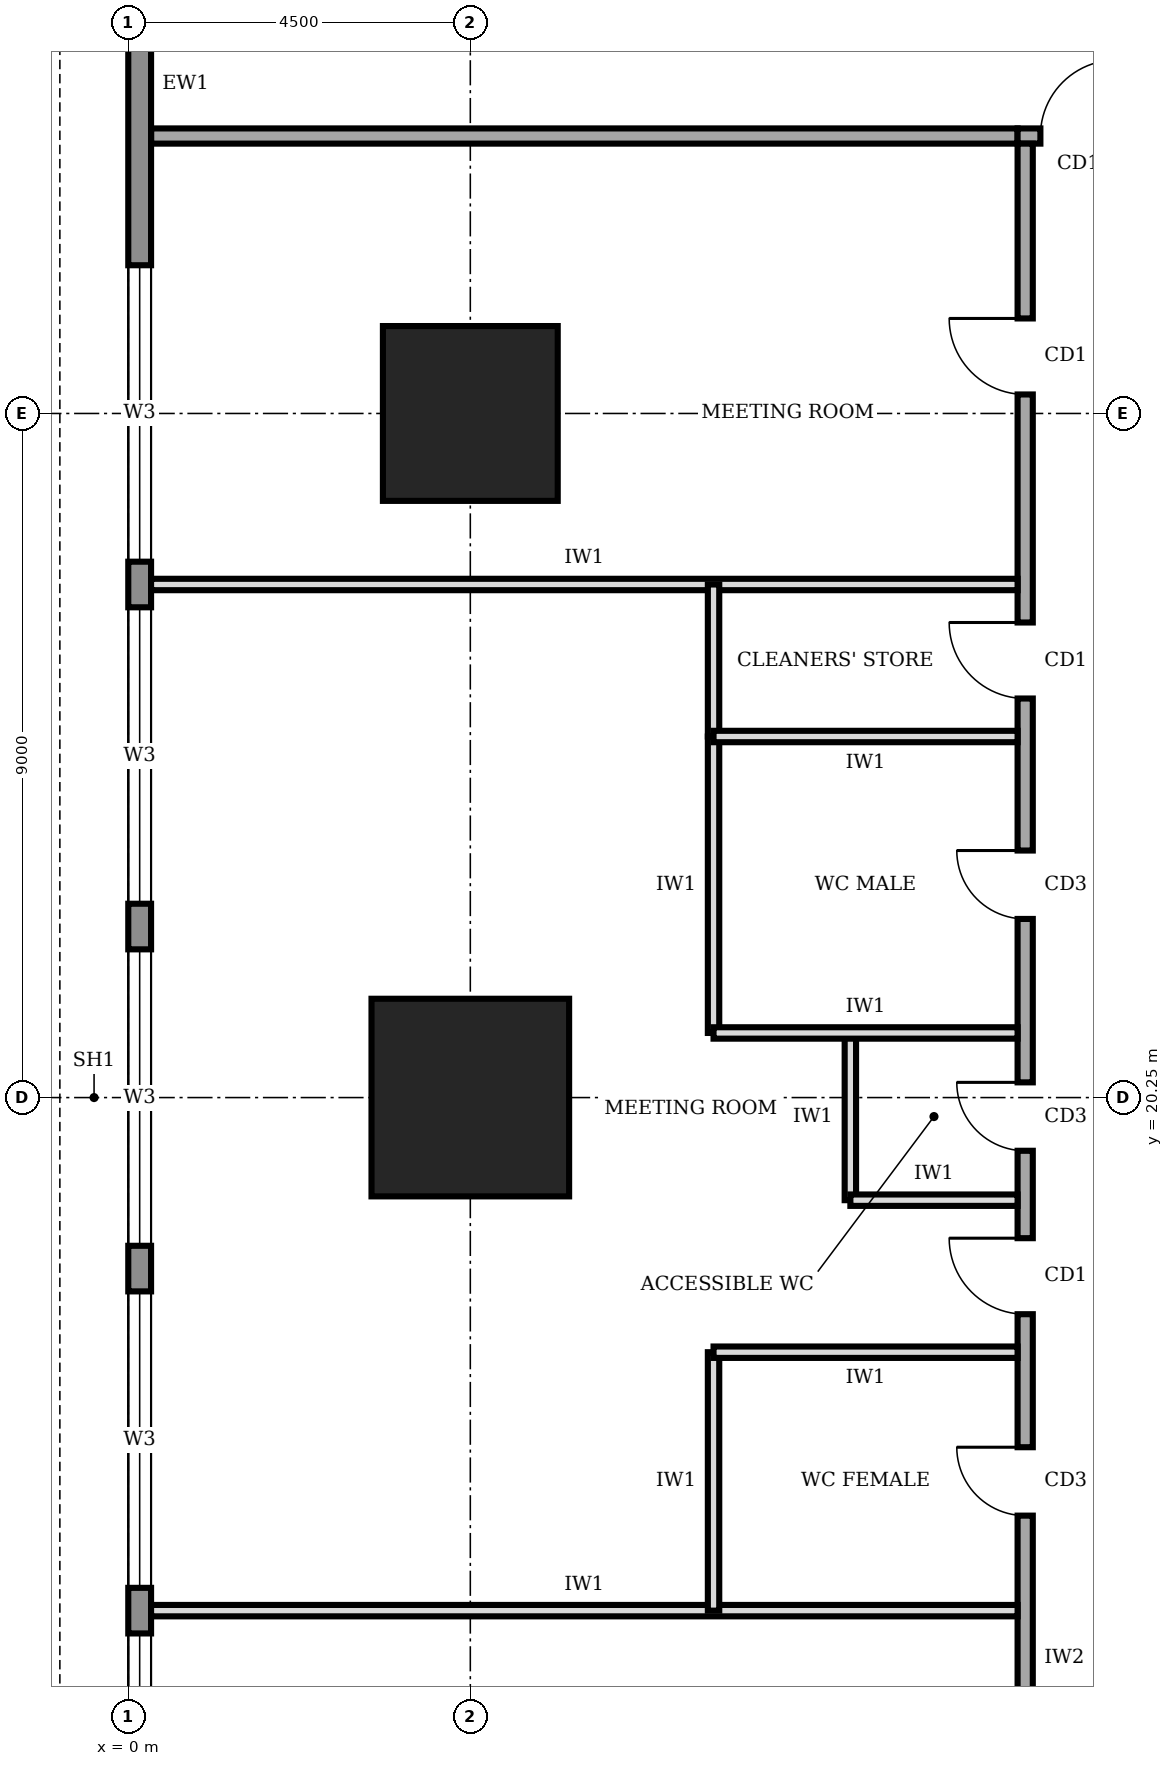
"""IFC4 building model, lengths in metres.
Left out: names, types, materials, properties, quantities, classifications, styles, units other than length and angle.
Written with IfcOpenShell. Run it as: python <this file> out.ifc"""

import sys

from ifc_helpers import new_model, si_unit, direction, frame, frame_2d, origin, origin_2d, place, context, subcontext, project, spatial, rectangle, extrude, element, fill, save


model = new_model("IFC4")
c1 = context("Model", 3, precision=1e-05, world=origin(), true_north=direction((0.0, 1.0)))
c2 = subcontext(c1, "Body", "Model", "MODEL_VIEW")
j1 = project(units=[si_unit("LENGTHUNIT", "METRE"), si_unit("PLANEANGLEUNIT", "RADIAN")], contexts=[c1])
p1 = place(None, origin())
s1 = spatial("IfcSite", under=j1, at=p1, CompositionType="ELEMENT")
p2 = place(p1, origin())
s2 = spatial("IfcBuilding", under=s1, at=p2, CompositionType="ELEMENT")
p3 = place(p2, frame((0.0, 0.0, 89.0)))
s3 = spatial("IfcBuildingStorey", under=s2, at=p3, CompositionType="ELEMENT", Elevation=89.0)
p4 = place(p3, frame((4.5, 20.25, 0.0), z_axis=(0.0, 0.0, 1.0), x_axis=(1.0, 0.0, 0.0)))
e1 = element("IfcColumn", 1, at=p4, inside=s3, PredefinedType="COLUMN", context=c2, shape_type="SweptSolid", body=[
    extrude(rectangle(XDim=2.6, YDim=2.6, at=origin_2d()), origin(), (0.0, 0.0, 1.0), 4.0),
])
p5 = place(p3, frame((4.5, 29.25, 0.0), z_axis=(0.0, 0.0, 1.0), x_axis=(1.0, 0.0, 0.0)))
e2 = element("IfcColumn", 2, at=p5, inside=s3, PredefinedType="COLUMN", context=c2, shape_type="SweptSolid", body=[
    extrude(rectangle(XDim=2.3, YDim=2.3, at=origin_2d()), origin(), (0.0, 0.0, 1.0), 4.0),
])
p6 = place(p3, frame((0.15, 35.98, 0.0), z_axis=(0.0, 0.0, 1.0), x_axis=(0.0, -1.0, 0.0)))
e3 = element("IfcWall", 3, at=p6, inside=s3, PredefinedType="STANDARD", context=c2, shape_type="SweptSolid", body=[
    extrude(rectangle(XDim=31.46, YDim=0.3, at=frame_2d((15.73, 0.0))), origin(), (0.0, 0.0, 1.0), 3.75),
])
p7 = place(p6, frame((27.28, 0.0, 0.95)))
e4 = element("IfcOpeningElement", 4, at=p7, cuts=e3, PredefinedType="OPENING", context=c2, shape_type="SweptSolid", body=[
    extrude(rectangle(XDim=3.9, YDim=1.8, at=frame_2d((1.95, 0.9))), frame((0.0, 0.16, 0.0), z_axis=(0.0, -1.0, 0.0), x_axis=(1.0, 0.0, 0.0)), (0.0, 0.0, 1.0), 0.32),
])
p8 = place(p6, frame((22.78, 0.0, 0.95)))
e5 = element("IfcOpeningElement", 5, at=p8, cuts=e3, PredefinedType="OPENING", context=c2, shape_type="SweptSolid", body=[
    extrude(rectangle(XDim=3.9, YDim=1.8, at=frame_2d((1.95, 0.9))), frame((0.0, 0.16, 0.0), z_axis=(0.0, -1.0, 0.0), x_axis=(1.0, 0.0, 0.0)), (0.0, 0.0, 1.0), 0.32),
])
p9 = place(p6, frame((18.28, 0.0, 0.95)))
e6 = element("IfcOpeningElement", 6, at=p9, cuts=e3, PredefinedType="OPENING", context=c2, shape_type="SweptSolid", body=[
    extrude(rectangle(XDim=3.9, YDim=1.8, at=frame_2d((1.95, 0.9))), frame((0.0, 0.16, 0.0), z_axis=(0.0, -1.0, 0.0), x_axis=(1.0, 0.0, 0.0)), (0.0, 0.0, 1.0), 0.32),
])
p10 = place(p6, frame((13.78, 0.0, 0.95)))
e7 = element("IfcOpeningElement", 7, at=p10, cuts=e3, PredefinedType="OPENING", context=c2, shape_type="SweptSolid", body=[
    extrude(rectangle(XDim=3.9, YDim=1.8, at=frame_2d((1.95, 0.9))), frame((0.0, 0.16, 0.0), z_axis=(0.0, -1.0, 0.0), x_axis=(1.0, 0.0, 0.0)), (0.0, 0.0, 1.0), 0.32),
])
p11 = place(p6, frame((9.28, 0.0, 0.95)))
e8 = element("IfcOpeningElement", 8, at=p11, cuts=e3, PredefinedType="OPENING", context=c2, shape_type="SweptSolid", body=[
    extrude(rectangle(XDim=3.9, YDim=1.8, at=frame_2d((1.95, 0.9))), frame((0.0, 0.16, 0.0), z_axis=(0.0, -1.0, 0.0), x_axis=(1.0, 0.0, 0.0)), (0.0, 0.0, 1.0), 0.32),
])
p12 = place(p6, frame((4.78, 0.0, 0.95)))
e9 = element("IfcOpeningElement", 9, at=p12, cuts=e3, PredefinedType="OPENING", context=c2, shape_type="SweptSolid", body=[
    extrude(rectangle(XDim=3.9, YDim=1.8, at=frame_2d((1.95, 0.9))), frame((0.0, 0.16, 0.0), z_axis=(0.0, -1.0, 0.0), x_axis=(1.0, 0.0, 0.0)), (0.0, 0.0, 1.0), 0.32),
])
p13 = place(p3, frame((40.2, 32.9, 0.0), z_axis=(0.0, 0.0, 1.0), x_axis=(-1.0, 0.0, 0.0)))
e10 = element("IfcWall", 10, at=p13, inside=s3, PredefinedType="SOLIDWALL", context=c2, shape_type="SweptSolid", body=[
    extrude(rectangle(XDim=28.5, YDim=0.2, at=frame_2d((14.25, 0.0))), origin(), (0.0, 0.0, 1.0), 3.75),
])
p14 = place(p13, frame((27.2, 0.0, 0.0)))
e11 = element("IfcOpeningElement", 11, at=p14, cuts=e10, PredefinedType="OPENING", context=c2, shape_type="SweptSolid", body=[
    extrude(rectangle(XDim=1.0, YDim=2.1, at=frame_2d((0.5, 1.05))), frame((0.0, 0.11, 0.0), z_axis=(0.0, -1.0, 0.0), x_axis=(1.0, 0.0, 0.0)), (0.0, 0.0, 1.0), 0.22),
])
p15 = place(p13, frame((23.95, 0.0, 0.0)))
e12 = element("IfcOpeningElement", 12, at=p15, cuts=e10, PredefinedType="OPENING", context=c2, shape_type="SweptSolid", body=[
    extrude(rectangle(XDim=1.0, YDim=2.1, at=frame_2d((0.5, 1.05))), frame((0.0, 0.11, 0.0), z_axis=(0.0, -1.0, 0.0), x_axis=(1.0, 0.0, 0.0)), (0.0, 0.0, 1.0), 0.22),
])
p16 = place(p13, frame((17.2, 0.0, 0.0)))
e13 = element("IfcOpeningElement", 13, at=p16, cuts=e10, PredefinedType="OPENING", context=c2, shape_type="SweptSolid", body=[
    extrude(rectangle(XDim=1.0, YDim=2.1, at=frame_2d((0.5, 1.05))), frame((0.0, 0.11, 0.0), z_axis=(0.0, -1.0, 0.0), x_axis=(1.0, 0.0, 0.0)), (0.0, 0.0, 1.0), 0.22),
])
p17 = place(p13, frame((6.0, 0.0, 0.0)))
e14 = element("IfcOpeningElement", 14, at=p17, cuts=e10, PredefinedType="OPENING", context=c2, shape_type="SweptSolid", body=[
    extrude(rectangle(XDim=1.0, YDim=2.1, at=frame_2d((0.5, 1.05))), frame((0.0, 0.11, 0.0), z_axis=(0.0, -1.0, 0.0), x_axis=(1.0, 0.0, 0.0)), (0.0, 0.0, 1.0), 0.22),
])
p18 = place(p3, frame((11.8, 32.8, 0.0), z_axis=(0.0, 0.0, 1.0), x_axis=(0.0, -1.0, 0.0)))
e15 = element("IfcWall", 15, at=p18, inside=s3, PredefinedType="SOLIDWALL", context=c2, shape_type="SweptSolid", body=[
    extrude(rectangle(XDim=25.3, YDim=0.2, at=frame_2d((12.65, 0.0))), origin(), (0.0, 0.0, 1.0), 3.75),
])
p19 = place(p18, frame((21.8, 0.0, 0.0)))
e16 = element("IfcOpeningElement", 16, at=p19, cuts=e15, PredefinedType="OPENING", context=c2, shape_type="SweptSolid", body=[
    extrude(rectangle(XDim=1.0, YDim=2.1, at=frame_2d((0.5, 1.05))), frame((0.0, 0.11, 0.0), z_axis=(0.0, -1.0, 0.0), x_axis=(1.0, 0.0, 0.0)), (0.0, 0.0, 1.0), 0.22),
])
p20 = place(p18, frame((17.15, 0.0, 0.0)))
e17 = element("IfcOpeningElement", 17, at=p20, cuts=e15, PredefinedType="OPENING", context=c2, shape_type="SweptSolid", body=[
    extrude(rectangle(XDim=0.9, YDim=2.1, at=frame_2d((0.45, 1.05))), frame((0.0, 0.11, 0.0), z_axis=(0.0, -1.0, 0.0), x_axis=(1.0, 0.0, 0.0)), (0.0, 0.0, 1.0), 0.22),
])
p21 = place(p18, frame((12.35, 0.0, 0.0)))
e18 = element("IfcOpeningElement", 18, at=p21, cuts=e15, PredefinedType="OPENING", context=c2, shape_type="SweptSolid", body=[
    extrude(rectangle(XDim=0.9, YDim=2.1, at=frame_2d((0.45, 1.05))), frame((0.0, 0.11, 0.0), z_axis=(0.0, -1.0, 0.0), x_axis=(1.0, 0.0, 0.0)), (0.0, 0.0, 1.0), 0.22),
])
p22 = place(p18, frame((9.3, 0.0, 0.0)))
e19 = element("IfcOpeningElement", 19, at=p22, cuts=e15, PredefinedType="OPENING", context=c2, shape_type="SweptSolid", body=[
    extrude(rectangle(XDim=0.9, YDim=2.1, at=frame_2d((0.45, 1.05))), frame((0.0, 0.11, 0.0), z_axis=(0.0, -1.0, 0.0), x_axis=(1.0, 0.0, 0.0)), (0.0, 0.0, 1.0), 0.22),
])
p23 = place(p18, frame((6.3, 0.0, 0.0)))
e20 = element("IfcOpeningElement", 20, at=p23, cuts=e15, PredefinedType="OPENING", context=c2, shape_type="SweptSolid", body=[
    extrude(rectangle(XDim=1.0, YDim=2.1, at=frame_2d((0.5, 1.05))), frame((0.0, 0.11, 0.0), z_axis=(0.0, -1.0, 0.0), x_axis=(1.0, 0.0, 0.0)), (0.0, 0.0, 1.0), 0.22),
])
p24 = place(p18, frame((14.4, 0.0, 0.0)))
e21 = element("IfcOpeningElement", 21, at=p24, cuts=e15, PredefinedType="OPENING", context=c2, shape_type="SweptSolid", body=[
    extrude(rectangle(XDim=1.0, YDim=2.1, at=frame_2d((0.5, 1.05))), frame((0.0, 0.11, 0.0), z_axis=(0.0, -1.0, 0.0), x_axis=(1.0, 0.0, 0.0)), (0.0, 0.0, 1.0), 0.22),
])
p25 = place(p18, frame((2.3, 0.0, 0.0)))
e22 = element("IfcOpeningElement", 22, at=p25, cuts=e15, PredefinedType="OPENING", context=c2, shape_type="SweptSolid", body=[
    extrude(rectangle(XDim=1.0, YDim=2.1, at=frame_2d((0.5, 1.05))), frame((0.0, 0.11, 0.0), z_axis=(0.0, -1.0, 0.0), x_axis=(1.0, 0.0, 0.0)), (0.0, 0.0, 1.0), 0.22),
])
p26 = place(p3, frame((0.3, 32.9, 0.0), z_axis=(0.0, 0.0, 1.0), x_axis=(1.0, 0.0, 0.0)))
e23 = element("IfcWall", 23, at=p26, inside=s3, PredefinedType="SOLIDWALL", context=c2, shape_type="SweptSolid", body=[
    extrude(rectangle(XDim=11.4, YDim=0.2, at=frame_2d((5.7, 0.0))), origin(), (0.0, 0.0, 1.0), 3.75),
])
for number, where, z_axis, x_axis in (
    (24, (0.3, 13.5, 0.0), (0.0, 0.0, 1.0), (1.0, 0.0, 0.0)),
    (25, (0.3, 27.0, 0.0), (0.0, 0.0, 1.0), (1.0, 0.0, 0.0)),
):
    element("IfcWall", number, at=place(p3, frame(where, z_axis=z_axis, x_axis=x_axis)), inside=s3, PredefinedType="PARTITIONING", context=c2, shape_type="SweptSolid", body=[
        extrude(rectangle(XDim=11.4, YDim=0.15, at=frame_2d((5.7, 0.0))), origin(), (0.0, 0.0, 1.0), 3.75),
    ])
p27 = place(p3, frame((11.7, 16.9, 0.0), z_axis=(0.0, 0.0, 1.0), x_axis=(-1.0, 0.0, 0.0)))
e26 = element("IfcWall", 26, at=p27, inside=s3, PredefinedType="PARTITIONING", context=c2, shape_type="SweptSolid", body=[
    extrude(rectangle(XDim=4.0, YDim=0.15, at=frame_2d((2.0, 0.0))), origin(), (0.0, 0.0, 1.0), 3.75),
])
p28 = place(p3, frame((11.7, 18.9, 0.0), z_axis=(0.0, 0.0, 1.0), x_axis=(-1.0, 0.0, 0.0)))
e27 = element("IfcWall", 27, at=p28, inside=s3, PredefinedType="PARTITIONING", context=c2, shape_type="SweptSolid", body=[
    extrude(rectangle(XDim=2.2, YDim=0.15, at=frame_2d((1.1, 0.0))), origin(), (0.0, 0.0, 1.0), 3.75),
])
p29 = place(p3, frame((11.7, 21.1, 0.0), z_axis=(0.0, 0.0, 1.0), x_axis=(-1.0, 0.0, 0.0)))
e28 = element("IfcWall", 28, at=p29, inside=s3, PredefinedType="PARTITIONING", context=c2, shape_type="SweptSolid", body=[
    extrude(rectangle(XDim=4.0, YDim=0.15, at=frame_2d((2.0, 0.0))), origin(), (0.0, 0.0, 1.0), 2.85),
])
p30 = place(p3, frame((11.7, 25.0, 0.0), z_axis=(0.0, 0.0, 1.0), x_axis=(-1.0, 0.0, 0.0)))
e29 = element("IfcWall", 29, at=p30, inside=s3, PredefinedType="PARTITIONING", context=c2, shape_type="SweptSolid", body=[
    extrude(rectangle(XDim=4.0, YDim=0.15, at=frame_2d((2.0, 0.0))), origin(), (0.0, 0.0, 1.0), 3.75),
])
p31 = place(p3, frame((7.7, 13.5, 0.0), z_axis=(0.0, 0.0, 1.0), x_axis=(0.0, 1.0, 0.0)))
e30 = element("IfcWall", 30, at=p31, inside=s3, PredefinedType="PARTITIONING", context=c2, shape_type="SweptSolid", body=[
    extrude(rectangle(XDim=3.4, YDim=0.15, at=frame_2d((1.7, 0.0))), origin(), (0.0, 0.0, 1.0), 3.75),
])
p32 = place(p3, frame((9.5, 18.9, 0.0), z_axis=(0.0, 0.0, 1.0), x_axis=(0.0, 1.0, 0.0)))
e31 = element("IfcWall", 31, at=p32, inside=s3, PredefinedType="PARTITIONING", context=c2, shape_type="SweptSolid", body=[
    extrude(rectangle(XDim=2.2, YDim=0.15, at=frame_2d((1.1, 0.0))), origin(), (0.0, 0.0, 1.0), 3.75),
])
p33 = place(p3, frame((7.7, 21.1, 0.0), z_axis=(0.0, 0.0, 1.0), x_axis=(0.0, 1.0, 0.0)))
e32 = element("IfcWall", 32, at=p33, inside=s3, PredefinedType="PARTITIONING", context=c2, shape_type="SweptSolid", body=[
    extrude(rectangle(XDim=3.9, YDim=0.15, at=frame_2d((1.95, 0.0))), origin(), (0.0, 0.0, 1.0), 3.75),
])
p34 = place(p3, frame((7.7, 25.0, 0.0), z_axis=(0.0, 0.0, 1.0), x_axis=(0.0, 1.0, 0.0)))
e33 = element("IfcWall", 33, at=p34, inside=s3, PredefinedType="PARTITIONING", context=c2, shape_type="SweptSolid", body=[
    extrude(rectangle(XDim=2.0, YDim=0.15, at=frame_2d((1.0, 0.0))), origin(), (0.0, 0.0, 1.0), 3.75),
])
p35 = place(p8, origin())
e34 = element("IfcWindow", 34, at=p35, inside=s3, PartitioningType="SINGLE_PANEL", PredefinedType="WINDOW", context=c2, shape_type="SweptSolid", body=[
    extrude(rectangle(XDim=3.9, YDim=1.8, at=frame_2d((1.95, 0.9))), frame((0.0, 0.03, 0.0), z_axis=(0.0, -1.0, 0.0), x_axis=(1.0, 0.0, 0.0)), (0.0, 0.0, 1.0), 0.06),
])
fill(e5, e34)
p36 = place(p9, origin())
e35 = element("IfcWindow", 35, at=p36, inside=s3, PartitioningType="SINGLE_PANEL", PredefinedType="WINDOW", context=c2, shape_type="SweptSolid", body=[
    extrude(rectangle(XDim=3.9, YDim=1.8, at=frame_2d((1.95, 0.9))), frame((0.0, 0.03, 0.0), z_axis=(0.0, -1.0, 0.0), x_axis=(1.0, 0.0, 0.0)), (0.0, 0.0, 1.0), 0.06),
])
fill(e6, e35)
p37 = place(p10, origin())
e36 = element("IfcWindow", 36, at=p37, inside=s3, PartitioningType="SINGLE_PANEL", PredefinedType="WINDOW", context=c2, shape_type="SweptSolid", body=[
    extrude(rectangle(XDim=3.9, YDim=1.8, at=frame_2d((1.95, 0.9))), frame((0.0, 0.03, 0.0), z_axis=(0.0, -1.0, 0.0), x_axis=(1.0, 0.0, 0.0)), (0.0, 0.0, 1.0), 0.06),
])
fill(e7, e36)
p38 = place(p11, origin())
e37 = element("IfcWindow", 37, at=p38, inside=s3, PartitioningType="SINGLE_PANEL", PredefinedType="WINDOW", context=c2, shape_type="SweptSolid", body=[
    extrude(rectangle(XDim=3.9, YDim=1.8, at=frame_2d((1.95, 0.9))), frame((0.0, 0.03, 0.0), z_axis=(0.0, -1.0, 0.0), x_axis=(1.0, 0.0, 0.0)), (0.0, 0.0, 1.0), 0.06),
])
fill(e8, e37)
p39 = place(p12, origin())
e38 = element("IfcWindow", 38, at=p39, inside=s3, PartitioningType="SINGLE_PANEL", PredefinedType="WINDOW", context=c2, shape_type="SweptSolid", body=[
    extrude(rectangle(XDim=3.9, YDim=1.8, at=frame_2d((1.95, 0.9))), frame((0.0, 0.03, 0.0), z_axis=(0.0, -1.0, 0.0), x_axis=(1.0, 0.0, 0.0)), (0.0, 0.0, 1.0), 0.06),
])
fill(e9, e38)
p40 = place(p14, frame((1.0, 0.0, 0.0), z_axis=(0.0, 0.0, 1.0), x_axis=(-1.0, 0.0, 0.0)))
e39 = element("IfcDoor", 39, at=p40, inside=s3, OperationType="SINGLE_SWING_RIGHT", PredefinedType="DOOR", context=c2, shape_type="SweptSolid", body=[
    extrude(rectangle(XDim=1.0, YDim=2.1, at=frame_2d((0.5, 1.05))), frame((0.0, 0.025, 0.0), z_axis=(0.0, -1.0, 0.0), x_axis=(1.0, 0.0, 0.0)), (0.0, 0.0, 1.0), 0.05),
])
fill(e11, e39)
p41 = place(p20, frame((0.9, 0.0, 0.0), z_axis=(0.0, 0.0, 1.0), x_axis=(-1.0, 0.0, 0.0)))
e40 = element("IfcDoor", 40, at=p41, inside=s3, OperationType="SINGLE_SWING_RIGHT", PredefinedType="DOOR", context=c2, shape_type="SweptSolid", body=[
    extrude(rectangle(XDim=0.9, YDim=2.1, at=frame_2d((0.45, 1.05))), frame((0.0, 0.025, 0.0), z_axis=(0.0, -1.0, 0.0), x_axis=(1.0, 0.0, 0.0)), (0.0, 0.0, 1.0), 0.05),
])
fill(e17, e40)
p42 = place(p21, frame((0.9, 0.0, 0.0), z_axis=(0.0, 0.0, 1.0), x_axis=(-1.0, 0.0, 0.0)))
e41 = element("IfcDoor", 41, at=p42, inside=s3, OperationType="SINGLE_SWING_RIGHT", PredefinedType="DOOR", context=c2, shape_type="SweptSolid", body=[
    extrude(rectangle(XDim=0.9, YDim=2.1, at=frame_2d((0.45, 1.05))), frame((0.0, 0.025, 0.0), z_axis=(0.0, -1.0, 0.0), x_axis=(1.0, 0.0, 0.0)), (0.0, 0.0, 1.0), 0.05),
])
fill(e18, e41)
p43 = place(p22, frame((0.9, 0.0, 0.0), z_axis=(0.0, 0.0, 1.0), x_axis=(-1.0, 0.0, 0.0)))
e42 = element("IfcDoor", 42, at=p43, inside=s3, OperationType="SINGLE_SWING_RIGHT", PredefinedType="DOOR", context=c2, shape_type="SweptSolid", body=[
    extrude(rectangle(XDim=0.9, YDim=2.1, at=frame_2d((0.45, 1.05))), frame((0.0, 0.025, 0.0), z_axis=(0.0, -1.0, 0.0), x_axis=(1.0, 0.0, 0.0)), (0.0, 0.0, 1.0), 0.05),
])
fill(e19, e42)
p44 = place(p23, frame((1.0, 0.0, 0.0), z_axis=(0.0, 0.0, 1.0), x_axis=(-1.0, 0.0, 0.0)))
e43 = element("IfcDoor", 43, at=p44, inside=s3, OperationType="SINGLE_SWING_RIGHT", PredefinedType="DOOR", context=c2, shape_type="SweptSolid", body=[
    extrude(rectangle(XDim=1.0, YDim=2.1, at=frame_2d((0.5, 1.05))), frame((0.0, 0.025, 0.0), z_axis=(0.0, -1.0, 0.0), x_axis=(1.0, 0.0, 0.0)), (0.0, 0.0, 1.0), 0.05),
])
fill(e20, e43)
p45 = place(p24, frame((1.0, 0.0, 0.0), z_axis=(0.0, 0.0, 1.0), x_axis=(-1.0, 0.0, 0.0)))
e44 = element("IfcDoor", 44, at=p45, inside=s3, OperationType="SINGLE_SWING_RIGHT", PredefinedType="DOOR", context=c2, shape_type="SweptSolid", body=[
    extrude(rectangle(XDim=1.0, YDim=2.1, at=frame_2d((0.5, 1.05))), frame((0.0, 0.025, 0.0), z_axis=(0.0, -1.0, 0.0), x_axis=(1.0, 0.0, 0.0)), (0.0, 0.0, 1.0), 0.05),
])
fill(e21, e44)
p46 = place(p25, frame((1.0, 0.0, 0.0), z_axis=(0.0, 0.0, 1.0), x_axis=(-1.0, 0.0, 0.0)))
e45 = element("IfcDoor", 45, at=p46, inside=s3, OperationType="SINGLE_SWING_RIGHT", PredefinedType="DOOR", context=c2, shape_type="SweptSolid", body=[
    extrude(rectangle(XDim=1.0, YDim=2.1, at=frame_2d((0.5, 1.05))), frame((0.0, 0.025, 0.0), z_axis=(0.0, -1.0, 0.0), x_axis=(1.0, 0.0, 0.0)), (0.0, 0.0, 1.0), 0.05),
])
fill(e22, e45)
save(model, sys.argv[1])
